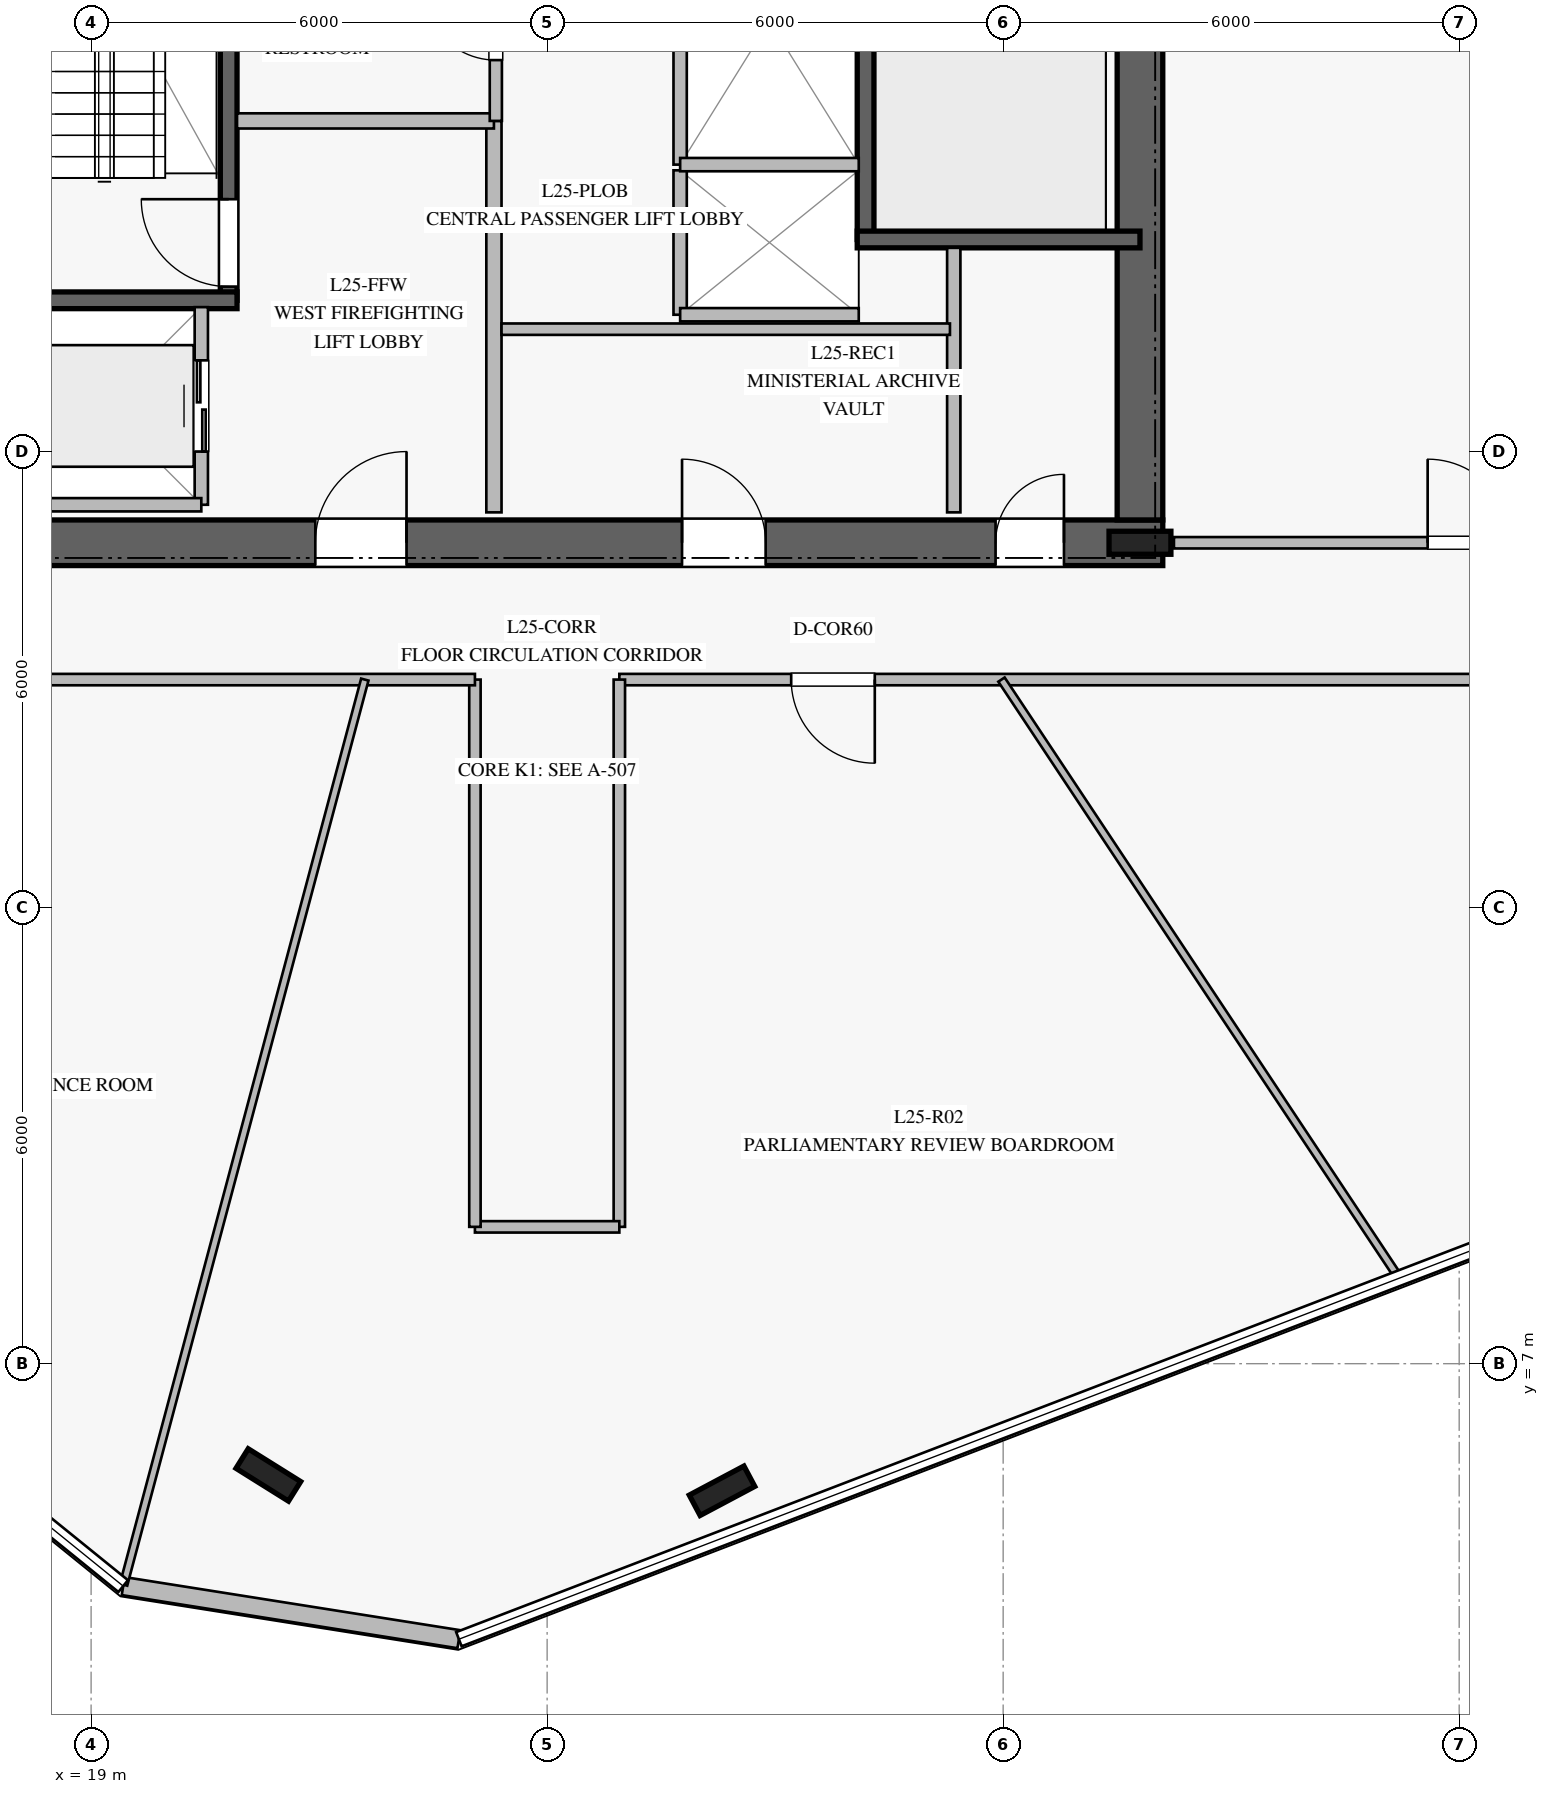
"""IFC4 building model, lengths in metres.
Left out: names, types, materials, properties, quantities, classifications, styles, units other than length and angle.
Written with IfcOpenShell. Run it as: python <this file> out.ifc"""

import sys

from ifc_helpers import new_model, si_unit, direction, frame, frame_2d, origin, origin_2d, place, context, subcontext, project, spatial, rectangle, i_section, extrude, element, fill, save


model = new_model("IFC4")
c1 = context("Model", 3, precision=1e-05, world=origin(), true_north=direction((0.0, 1.0)))
c2 = subcontext(c1, "Body", "Model", "MODEL_VIEW")
j1 = project(units=[si_unit("LENGTHUNIT", "METRE"), si_unit("PLANEANGLEUNIT", "RADIAN")], contexts=[c1])
p1 = place(None, origin())
s1 = spatial("IfcSite", under=j1, at=p1, CompositionType="ELEMENT")
p2 = place(p1, origin())
s2 = spatial("IfcBuilding", under=s1, at=p2, CompositionType="ELEMENT")
p3 = place(p2, frame((0.0, 0.0, 106.4)))
s3 = spatial("IfcBuildingStorey", under=s2, at=p3, CompositionType="ELEMENT", Elevation=106.4)
p4 = place(p3, frame((16.9, 17.8, 0.0), z_axis=(0.0, 0.0, 1.0), x_axis=(1.0, 0.0, 0.0)))
e1 = element("IfcWall", 1, at=p4, inside=s3, PredefinedType="SHEAR", context=c2, shape_type="SweptSolid", body=[
    extrude(rectangle(XDim=16.2, YDim=0.6, at=frame_2d((8.1, 0.0))), origin(), (0.0, 0.0, 1.0), 3.76),
])
p5 = place(p4, frame((5.05, 0.0, 0.0)))
e2 = element("IfcOpeningElement", 2, at=p5, cuts=e1, PredefinedType="OPENING", context=c2, shape_type="SweptSolid", body=[
    extrude(rectangle(XDim=1.2, YDim=2.25, at=frame_2d((0.6, 1.125))), frame((0.0, 0.31, 0.0), z_axis=(0.0, -1.0, 0.0), x_axis=(1.0, 0.0, 0.0)), (0.0, 0.0, 1.0), 0.62),
])
p6 = place(p4, frame((14.0, 0.0, 0.0)))
e3 = element("IfcOpeningElement", 3, at=p6, cuts=e1, PredefinedType="OPENING", context=c2, shape_type="SweptSolid", body=[
    extrude(rectangle(XDim=0.9, YDim=2.1, at=frame_2d((0.45, 1.05))), frame((0.0, 0.31, 0.0), z_axis=(0.0, -1.0, 0.0), x_axis=(1.0, 0.0, 0.0)), (0.0, 0.0, 1.0), 0.62),
])
p7 = place(p4, frame((9.875, 0.0, 0.0)))
e4 = element("IfcOpeningElement", 4, at=p7, cuts=e1, PredefinedType="OPENING", context=c2, shape_type="SweptSolid", body=[
    extrude(rectangle(XDim=1.1, YDim=2.2, at=frame_2d((0.55, 1.1))), frame((0.0, 0.31, 0.0), z_axis=(0.0, -1.0, 0.0), x_axis=(1.0, 0.0, 0.0)), (0.0, 0.0, 1.0), 0.62),
])
p8 = place(p3, frame((32.8, 18.1, 0.0), z_axis=(0.0, 0.0, 1.0), x_axis=(0.0, 1.0, 0.0)))
e5 = element("IfcWall", 5, at=p8, inside=s3, PredefinedType="SHEAR", context=c2, shape_type="SweptSolid", body=[
    extrude(rectangle(XDim=13.8, YDim=0.6, at=frame_2d((6.9, 0.0))), origin(), (0.0, 0.0, 1.0), 3.76),
])
p9 = place(p3, frame((32.8, 17.8, 0.0), z_axis=(0.0, 0.0, 1.0), x_axis=(1.0, 0.0, 0.0)))
e6 = element("IfcColumn", 6, at=p9, inside=s3, PredefinedType="COLUMN", context=c2, shape_type="SweptSolid", body=[
    extrude(i_section(OverallWidth=0.303, OverallDepth=0.814, WebThickness=0.021, FlangeThickness=0.04, at=origin_2d()), origin(), (0.0, 0.0, 1.0), 4.0),
])
p10 = place(p3, frame((20.81, 20.99, 0.0), z_axis=(0.0, 0.0, 1.0), x_axis=(0.0, 1.0, 0.0)))
e7 = element("IfcWall", 7, at=p10, inside=s3, PredefinedType="SOLIDWALL", context=c2, shape_type="SweptSolid", body=[
    extrude(rectangle(XDim=7.22, YDim=0.22, at=frame_2d((3.61, 0.0))), origin(), (0.0, 0.0, 1.0), 3.76),
])
p11 = place(p10, frame((0.18, 0.0, 0.0)))
e8 = element("IfcOpeningElement", 8, at=p11, cuts=e7, PredefinedType="OPENING", context=c2, shape_type="SweptSolid", body=[
    extrude(rectangle(XDim=1.15, YDim=2.2, at=frame_2d((0.575, 1.1))), frame((0.0, 0.12, 0.0), z_axis=(0.0, -1.0, 0.0), x_axis=(1.0, 0.0, 0.0)), (0.0, 0.0, 1.0), 0.24),
])
p12 = place(p3, frame((17.2, 20.99, 0.0), z_axis=(0.0, 0.0, 1.0), x_axis=(1.0, 0.0, 0.0)))
e9 = element("IfcWall", 9, at=p12, inside=s3, PredefinedType="SOLIDWALL", context=c2, shape_type="SweptSolid", body=[
    extrude(rectangle(XDim=3.72, YDim=0.22, at=frame_2d((1.86, 0.0))), origin(), (0.0, 0.0, 1.0), 3.76),
])
p13 = place(p3, frame((29.19, 21.79, 0.0), z_axis=(0.0, 0.0, 1.0), x_axis=(0.0, 1.0, 0.0)))
e10 = element("IfcWall", 10, at=p13, inside=s3, PredefinedType="SOLIDWALL", context=c2, shape_type="SweptSolid", body=[
    extrude(rectangle(XDim=7.22, YDim=0.22, at=frame_2d((3.61, 0.0))), origin(), (0.0, 0.0, 1.0), 3.76),
])
p14 = place(p13, frame((5.88, 0.0, 0.0)))
e11 = element("IfcOpeningElement", 11, at=p14, cuts=e10, PredefinedType="OPENING", context=c2, shape_type="SweptSolid", body=[
    extrude(rectangle(XDim=1.15, YDim=2.2, at=frame_2d((0.575, 1.1))), frame((0.0, 0.12, 0.0), z_axis=(0.0, -1.0, 0.0), x_axis=(1.0, 0.0, 0.0)), (0.0, 0.0, 1.0), 0.24),
])
p15 = place(p3, frame((29.08, 21.79, 0.0), z_axis=(0.0, 0.0, 1.0), x_axis=(1.0, 0.0, 0.0)))
e12 = element("IfcWall", 12, at=p15, inside=s3, PredefinedType="SOLIDWALL", context=c2, shape_type="SweptSolid", body=[
    extrude(rectangle(XDim=3.72, YDim=0.22, at=frame_2d((1.86, 0.0))), origin(), (0.0, 0.0, 1.0), 3.76),
])
for number, where, z_axis, x_axis in (
    (13, (21.332, 5.536, 0.0), (0.0, 0.0, 1.0), (-0.848, 0.53, 0.0)),
    (14, (27.301, 5.328, 0.0), (0.0, 0.0, 1.0), (0.883, 0.469, 0.0)),
):
    element("IfcColumn", number, at=place(p3, frame(where, z_axis=z_axis, x_axis=x_axis)), inside=s3, PredefinedType="COLUMN", context=c2, shape_type="SweptSolid", body=[
        extrude(i_section(OverallWidth=0.303, OverallDepth=0.814, WebThickness=0.021, FlangeThickness=0.04, at=origin_2d()), origin(), (0.0, 0.0, 1.0), 4.0),
    ])
p16 = place(p3, frame((19.422, 4.074, 0.0), z_axis=(0.0, 0.0, 1.0), x_axis=(0.987709346229, -0.156301783012, 0.0)))
e15 = element("IfcWall", 15, at=p16, inside=s3, PredefinedType="STANDARD", context=c2, shape_type="SweptSolid", body=[
    extrude(rectangle(XDim=4.472, YDim=0.24, at=frame_2d((2.236, 0.0))), origin(), (0.0, 0.0, 1.0), 3.76),
])
p17 = place(p3, frame((24.3, 18.2, 0.0), z_axis=(0.0, 0.0, 1.0), x_axis=(0.0, 1.0, 0.0)))
e16 = element("IfcWall", 16, at=p17, inside=s3, PredefinedType="PARTITIONING", context=c2, shape_type="SweptSolid", body=[
    extrude(rectangle(XDim=5.15, YDim=0.2, at=frame_2d((2.575, 0.0))), origin(), (0.0, 0.0, 1.0), 3.76),
])
p18 = place(p3, frame((20.92, 23.35, 0.0), z_axis=(0.0, 0.0, 1.0), x_axis=(1.0, 0.0, 0.0)))
e17 = element("IfcWall", 17, at=p18, inside=s3, PredefinedType="PARTITIONING", context=c2, shape_type="SweptSolid", body=[
    extrude(rectangle(XDim=3.38, YDim=0.2, at=frame_2d((1.69, 0.0))), origin(), (0.0, 0.0, 1.0), 3.76),
])
p19 = place(p3, frame((24.325, 23.35, 0.0), z_axis=(0.0, 0.0, 1.0), x_axis=(0.0, 1.0, 0.0)))
e18 = element("IfcWall", 18, at=p19, inside=s3, PredefinedType="PLUMBINGWALL", context=c2, shape_type="SweptSolid", body=[
    extrude(rectangle(XDim=4.93, YDim=0.16, at=frame_2d((2.465, 0.0))), origin(), (0.0, 0.0, 1.0), 3.76),
])
p20 = place(p19, frame((0.8, 0.0, 0.0)))
e19 = element("IfcOpeningElement", 19, at=p20, cuts=e18, PredefinedType="OPENING", context=c2, shape_type="SweptSolid", body=[
    extrude(rectangle(XDim=0.95, YDim=2.1, at=frame_2d((0.475, 1.05))), frame((0.0, 0.09, 0.0), z_axis=(0.0, -1.0, 0.0), x_axis=(1.0, 0.0, 0.0)), (0.0, 0.0, 1.0), 0.18),
])
p21 = place(p19, frame((3.26, 0.0, 0.0)))
e20 = element("IfcOpeningElement", 20, at=p21, cuts=e18, PredefinedType="OPENING", context=c2, shape_type="SweptSolid", body=[
    extrude(rectangle(XDim=0.9, YDim=2.1, at=frame_2d((0.45, 1.05))), frame((0.0, 0.09, 0.0), z_axis=(0.0, -1.0, 0.0), x_axis=(1.0, 0.0, 0.0)), (0.0, 0.0, 1.0), 0.18),
])
p22 = place(p3, frame((30.35, 18.2, 0.0), z_axis=(0.0, 0.0, 1.0), x_axis=(0.0, 1.0, 0.0)))
e21 = element("IfcWall", 21, at=p22, inside=s3, PredefinedType="PARTITIONING", context=c2, shape_type="SweptSolid", body=[
    extrude(rectangle(XDim=3.48, YDim=0.175, at=frame_2d((1.74, 0.0))), origin(), (0.0, 0.0, 1.0), 3.76),
])
p23 = place(p3, frame((24.4, 20.61, 0.0), z_axis=(0.0, 0.0, 1.0), x_axis=(1.0, 0.0, 0.0)))
e22 = element("IfcWall", 22, at=p23, inside=s3, PredefinedType="PARTITIONING", context=c2, shape_type="SweptSolid", body=[
    extrude(rectangle(XDim=5.9, YDim=0.15, at=frame_2d((2.95, 0.0))), origin(), (0.0, 0.0, 1.0), 3.76),
])
p24 = place(p3, frame((26.75, 20.8, 0.0), z_axis=(0.0, 0.0, 1.0), x_axis=(0.0, 1.0, 0.0)))
e23 = element("IfcWall", 23, at=p24, inside=s3, PredefinedType="PARTITIONING", context=c2, shape_type="SweptSolid", body=[
    extrude(rectangle(XDim=1.9, YDim=0.175, at=frame_2d((0.95, 0.0))), origin(), (0.0, 0.0, 1.0), 3.76),
])
p25 = place(p3, frame((26.75, 20.8, 0.0), z_axis=(0.0, 0.0, 1.0), x_axis=(1.0, 0.0, 0.0)))
e24 = element("IfcWall", 24, at=p25, inside=s3, PredefinedType="PARTITIONING", context=c2, shape_type="SweptSolid", body=[
    extrude(rectangle(XDim=2.35, YDim=0.175, at=frame_2d((1.175, 0.0))), origin(), (0.0, 0.0, 1.0), 3.76),
])
p26 = place(p3, frame((26.75, 22.775, 0.0), z_axis=(0.0, 0.0, 1.0), x_axis=(0.0, 1.0, 0.0)))
e25 = element("IfcWall", 25, at=p26, inside=s3, PredefinedType="PARTITIONING", context=c2, shape_type="SweptSolid", body=[
    extrude(rectangle(XDim=1.9, YDim=0.175, at=frame_2d((0.95, 0.0))), origin(), (0.0, 0.0, 1.0), 3.76),
])
p27 = place(p3, frame((26.75, 22.775, 0.0), z_axis=(0.0, 0.0, 1.0), x_axis=(1.0, 0.0, 0.0)))
e26 = element("IfcWall", 26, at=p27, inside=s3, PredefinedType="PARTITIONING", context=c2, shape_type="SweptSolid", body=[
    extrude(rectangle(XDim=2.35, YDim=0.175, at=frame_2d((1.175, 0.0))), origin(), (0.0, 0.0, 1.0), 3.76),
])
p28 = place(p3, frame((20.45, 18.3, 0.0), z_axis=(0.0, 0.0, 1.0), x_axis=(0.0, 1.0, 0.0)))
e27 = element("IfcWall", 27, at=p28, inside=s3, PredefinedType="PARTITIONING", context=c2, shape_type="SweptSolid", body=[
    extrude(rectangle(XDim=2.6, YDim=0.175, at=frame_2d((1.3, 0.0))), origin(), (0.0, 0.0, 1.0), 3.76),
])
p29 = place(p28, frame((0.7, 0.0, 0.0)))
e28 = element("IfcOpeningElement", 28, at=p29, cuts=e27, PredefinedType="OPENING", context=c2, shape_type="SweptSolid", body=[
    extrude(rectangle(XDim=1.2, YDim=2.2, at=frame_2d((0.6, 1.1))), frame((0.0, 0.098, 0.0), z_axis=(0.0, -1.0, 0.0), x_axis=(1.0, 0.0, 0.0)), (0.0, 0.0, 1.0), 0.195),
])
p30 = place(p3, frame((17.85, 18.3, 0.0), z_axis=(0.0, 0.0, 1.0), x_axis=(1.0, 0.0, 0.0)))
e29 = element("IfcWall", 29, at=p30, inside=s3, PredefinedType="PARTITIONING", context=c2, shape_type="SweptSolid", body=[
    extrude(rectangle(XDim=2.6, YDim=0.175, at=frame_2d((1.3, 0.0))), origin(), (0.0, 0.0, 1.0), 3.76),
])
p31 = place(p3, frame((33.247, 17.8, 0.0), z_axis=(0.0, 0.0, 1.0), x_axis=(1.0, 0.0, 0.0)))
e30 = element("IfcWall", 30, at=p31, inside=s3, PredefinedType="PARTITIONING", context=c2, shape_type="SweptSolid", body=[
    extrude(rectangle(XDim=7.953, YDim=0.15, at=frame_2d((3.977, 0.0))), origin(), (0.0, 0.0, 1.0), 3.21),
])
p32 = place(p31, frame((3.338, 0.0, 0.0)))
e31 = element("IfcOpeningElement", 31, at=p32, cuts=e30, PredefinedType="OPENING", context=c2, shape_type="SweptSolid", body=[
    extrude(rectangle(XDim=1.1, YDim=2.2, at=frame_2d((0.55, 1.1))), frame((0.0, 0.085, 0.0), z_axis=(0.0, -1.0, 0.0), x_axis=(1.0, 0.0, 0.0)), (0.0, 0.0, 1.0), 0.17),
])
p33 = place(p3, frame((41.196, 16.0, 0.0), z_axis=(0.0, 0.0, 1.0), x_axis=(-1.0, 0.0, 0.0)))
e32 = element("IfcWall", 32, at=p33, inside=s3, PredefinedType="PARTITIONING", context=c2, shape_type="SweptSolid", body=[
    extrude(rectangle(XDim=15.246, YDim=0.15, at=frame_2d((7.623, 0.0))), origin(), (0.0, 0.0, 1.0), 3.21),
])
p34 = place(p33, frame((11.885, 0.0, 0.0)))
e33 = element("IfcOpeningElement", 33, at=p34, cuts=e32, PredefinedType="OPENING", context=c2, shape_type="SweptSolid", body=[
    extrude(rectangle(XDim=1.1, YDim=2.2, at=frame_2d((0.55, 1.1))), frame((0.0, 0.085, 0.0), z_axis=(0.0, -1.0, 0.0), x_axis=(1.0, 0.0, 0.0)), (0.0, 0.0, 1.0), 0.17),
])
p35 = place(p3, frame((25.95, 16.0, 0.0), z_axis=(0.0, 0.0, 1.0), x_axis=(0.0, -1.0, 0.0)))
e34 = element("IfcWall", 34, at=p35, inside=s3, PredefinedType="PARTITIONING", context=c2, shape_type="SweptSolid", body=[
    extrude(rectangle(XDim=7.2, YDim=0.15, at=frame_2d((3.6, 0.0))), origin(), (0.0, 0.0, 1.0), 3.36),
])
p36 = place(p3, frame((25.95, 8.8, 0.0), z_axis=(0.0, 0.0, 1.0), x_axis=(-1.0, 0.0, 0.0)))
e35 = element("IfcWall", 35, at=p36, inside=s3, PredefinedType="PARTITIONING", context=c2, shape_type="SweptSolid", body=[
    extrude(rectangle(XDim=1.9, YDim=0.15, at=frame_2d((0.95, 0.0))), origin(), (0.0, 0.0, 1.0), 3.76),
])
p37 = place(p3, frame((24.05, 8.8, 0.0), z_axis=(0.0, 0.0, 1.0), x_axis=(0.0, 1.0, 0.0)))
e36 = element("IfcWall", 36, at=p37, inside=s3, PredefinedType="PARTITIONING", context=c2, shape_type="SweptSolid", body=[
    extrude(rectangle(XDim=7.2, YDim=0.15, at=frame_2d((3.6, 0.0))), origin(), (0.0, 0.0, 1.0), 3.36),
])
p38 = place(p3, frame((24.05, 16.0, 0.0), z_axis=(0.0, 0.0, 1.0), x_axis=(-1.0, 0.0, 0.0)))
e37 = element("IfcWall", 37, at=p38, inside=s3, PredefinedType="PARTITIONING", context=c2, shape_type="SweptSolid", body=[
    extrude(rectangle(XDim=6.85, YDim=0.15, at=frame_2d((3.425, 0.0))), origin(), (0.0, 0.0, 1.0), 3.21),
])
p39 = place(p3, frame((22.601, 16.0, 0.0), z_axis=(0.0, 0.0, 1.0), x_axis=(-0.257557841834, -0.966262882506, 0.0)))
e38 = element("IfcWall", 38, at=p39, inside=s3, PredefinedType="MOVABLE", context=c2, shape_type="SweptSolid", body=[
    extrude(rectangle(XDim=12.324, YDim=0.1, at=frame_2d((6.162, 0.0))), origin(), (0.0, 0.0, 1.0), 3.16),
])
p40 = place(p3, frame((30.978, 16.0, 0.0), z_axis=(0.0, 0.0, 1.0), x_axis=(0.553320396836, -0.832968509876, 0.0)))
e39 = element("IfcWall", 39, at=p40, inside=s3, PredefinedType="MOVABLE", context=c2, shape_type="SweptSolid", body=[
    extrude(rectangle(XDim=9.438, YDim=0.1, at=frame_2d((4.719, 0.0))), origin(), (0.0, 0.0, 1.0), 3.05),
])
p41 = place(p3, frame((33.1, 24.572, 0.0), z_axis=(0.0, 0.0, 1.0), x_axis=(0.998606672966, -0.052770377176, 0.0)))
e40 = element("IfcWall", 40, at=p41, inside=s3, PredefinedType="MOVABLE", context=c2, shape_type="SweptSolid", body=[
    extrude(rectangle(XDim=11.751, YDim=0.1, at=frame_2d((5.875, 0.0))), origin(), (0.0, 0.0, 1.0), 3.16),
])
p42 = place(p11, origin())
e41 = element("IfcDoor", 41, at=p42, inside=s3, OperationType="SINGLE_SWING_RIGHT", PredefinedType="DOOR", context=c2, shape_type="SweptSolid", body=[
    extrude(rectangle(XDim=1.15, YDim=2.2, at=frame_2d((0.575, 1.1))), frame((0.0, 0.025, 0.0), z_axis=(0.0, -1.0, 0.0), x_axis=(1.0, 0.0, 0.0)), (0.0, 0.0, 1.0), 0.05),
])
fill(e8, e41)
p43 = place(p5, origin())
e42 = element("IfcDoor", 42, at=p43, inside=s3, OperationType="SINGLE_SWING_RIGHT", PredefinedType="DOOR", context=c2, shape_type="SweptSolid", body=[
    extrude(rectangle(XDim=1.2, YDim=2.25, at=frame_2d((0.6, 1.125))), frame((0.0, 0.025, 0.0), z_axis=(0.0, -1.0, 0.0), x_axis=(1.0, 0.0, 0.0)), (0.0, 0.0, 1.0), 0.05),
])
fill(e2, e42)
p44 = place(p20, origin())
e43 = element("IfcDoor", 43, at=p44, inside=s3, OperationType="SINGLE_SWING_RIGHT", PredefinedType="DOOR", context=c2, shape_type="SweptSolid", body=[
    extrude(rectangle(XDim=0.95, YDim=2.1, at=frame_2d((0.475, 1.05))), frame((0.0, 0.025, 0.0), z_axis=(0.0, -1.0, 0.0), x_axis=(1.0, 0.0, 0.0)), (0.0, 0.0, 1.0), 0.05),
])
fill(e19, e43)
p45 = place(p6, origin())
e44 = element("IfcDoor", 44, at=p45, inside=s3, OperationType="SINGLE_SWING_RIGHT", PredefinedType="DOOR", context=c2, shape_type="SweptSolid", body=[
    extrude(rectangle(XDim=0.9, YDim=2.1, at=frame_2d((0.45, 1.05))), frame((0.0, 0.025, 0.0), z_axis=(0.0, -1.0, 0.0), x_axis=(1.0, 0.0, 0.0)), (0.0, 0.0, 1.0), 0.05),
])
fill(e3, e44)
p46 = place(p7, origin())
e45 = element("IfcDoor", 45, at=p46, inside=s3, OperationType="SINGLE_SWING_LEFT", PredefinedType="DOOR", context=c2, shape_type="SweptSolid", body=[
    extrude(rectangle(XDim=1.1, YDim=2.2, at=frame_2d((0.55, 1.1))), frame((0.0, 0.025, 0.0), z_axis=(0.0, -1.0, 0.0), x_axis=(1.0, 0.0, 0.0)), (0.0, 0.0, 1.0), 0.05),
])
fill(e4, e45)
p47 = place(p29, origin())
e46 = element("IfcDoor", 46, at=p47, inside=s3, OperationType="DOUBLE_DOOR_SLIDING", PredefinedType="DOOR", context=c2, shape_type="SweptSolid", body=[
    extrude(rectangle(XDim=1.2, YDim=2.2, at=frame_2d((0.6, 1.1))), frame((0.0, 0.025, 0.0), z_axis=(0.0, -1.0, 0.0), x_axis=(1.0, 0.0, 0.0)), (0.0, 0.0, 1.0), 0.05),
])
fill(e28, e46)
p48 = place(p34, origin())
e47 = element("IfcDoor", 47, at=p48, inside=s3, OperationType="SINGLE_SWING_LEFT", PredefinedType="DOOR", context=c2, shape_type="SweptSolid", body=[
    extrude(rectangle(XDim=1.1, YDim=2.2, at=frame_2d((0.55, 1.1))), frame((0.0, 0.025, 0.0), z_axis=(0.0, -1.0, 0.0), x_axis=(1.0, 0.0, 0.0)), (0.0, 0.0, 1.0), 0.05),
])
fill(e33, e47)
p49 = place(p32, origin())
e48 = element("IfcDoor", 48, at=p49, inside=s3, OperationType="SINGLE_SWING_LEFT", PredefinedType="DOOR", context=c2, shape_type="SweptSolid", body=[
    extrude(rectangle(XDim=1.1, YDim=2.2, at=frame_2d((0.55, 1.1))), frame((0.0, 0.025, 0.0), z_axis=(0.0, -1.0, 0.0), x_axis=(1.0, 0.0, 0.0)), (0.0, 0.0, 1.0), 0.05),
])
fill(e31, e48)
save(model, sys.argv[1])
